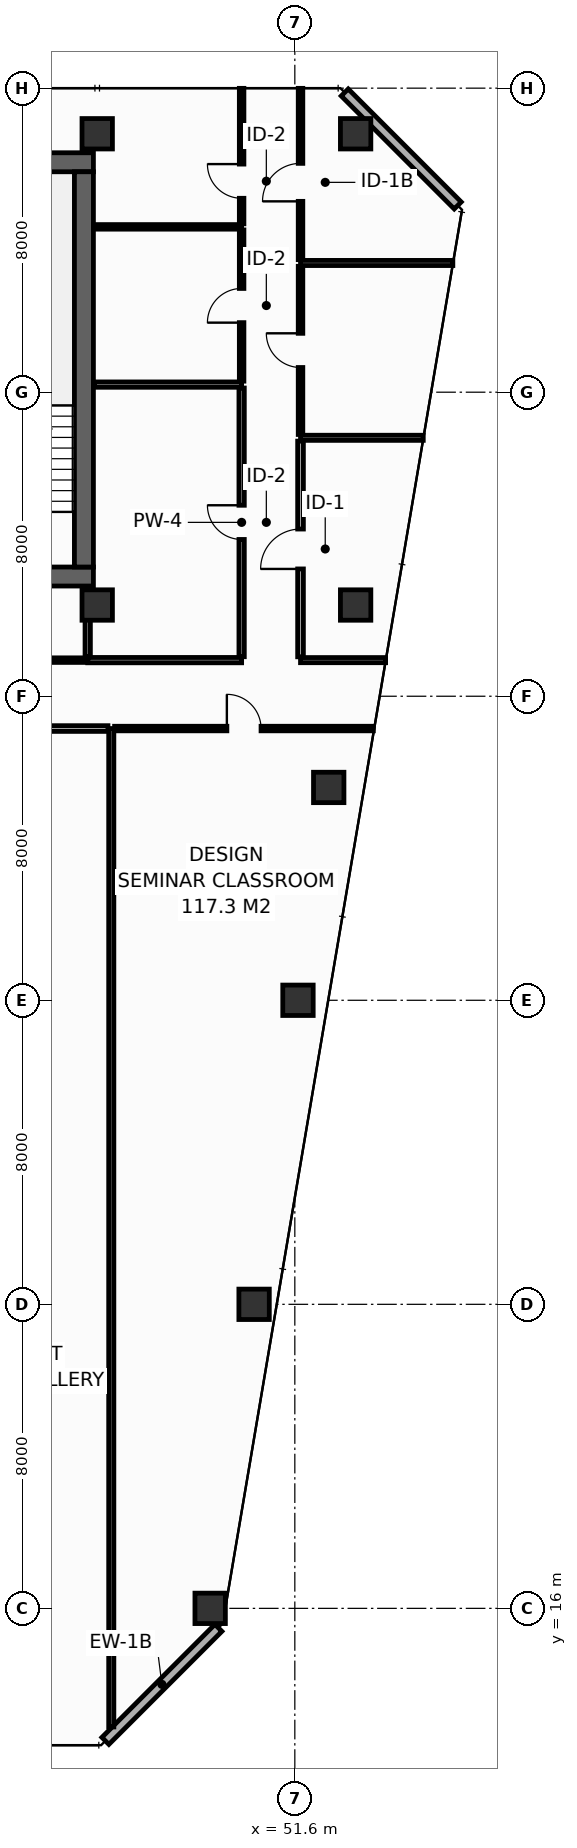
"""IFC4 building model, lengths in metres.
Left out: names, types, materials, properties, quantities, classifications, styles, units other than length and angle.
Written with IfcOpenShell. Run it as: python <this file> out.ifc"""

import sys

from ifc_helpers import new_model, si_unit, direction, frame, frame_2d, origin, origin_2d, place, context, subcontext, project, spatial, rectangle, hollow_rectangle, extrude, element, fill, save


model = new_model("IFC4")
c1 = context("Model", 3, precision=1e-05, world=origin(), true_north=direction((0.0, 1.0)))
c2 = subcontext(c1, "Body", "Model", "MODEL_VIEW")
j1 = project(units=[si_unit("LENGTHUNIT", "METRE"), si_unit("PLANEANGLEUNIT", "RADIAN")], contexts=[c1])
p1 = place(None, origin())
s1 = spatial("IfcSite", under=j1, at=p1, CompositionType="ELEMENT")
p2 = place(p1, origin())
s2 = spatial("IfcBuilding", under=s1, at=p2, CompositionType="ELEMENT")
p3 = place(p2, frame((0.0, 0.0, 182.8)))
s3 = spatial("IfcBuildingStorey", under=s2, at=p3, CompositionType="ELEMENT", Elevation=182.8)
p4 = place(p3, frame((13.6, 43.15, 0.0), z_axis=(0.0, 0.0, 1.0), x_axis=(1.0, 0.0, 0.0)))
e1 = element("IfcWall", 1, at=p4, inside=s3, PredefinedType="SHEAR", context=c2, shape_type="SweptSolid", body=[
    extrude(rectangle(XDim=32.7, YDim=0.5, at=frame_2d((16.35, 0.0))), origin(), (0.0, 0.0, 1.0), 3.55),
])
p5 = place(p4, frame((5.4, 0.0, 0.0)))
e2 = element("IfcOpeningElement", 2, at=p5, cuts=e1, PredefinedType="OPENING", context=c2, shape_type="SweptSolid", body=[
    extrude(rectangle(XDim=1.1, YDim=2.15, at=frame_2d((0.55, 1.075))), frame((0.0, 0.26, 0.0), z_axis=(0.0, -1.0, 0.0), x_axis=(1.0, 0.0, 0.0)), (0.0, 0.0, 1.0), 0.52),
])
p6 = place(p4, frame((25.6, 0.0, 0.0)))
e3 = element("IfcOpeningElement", 3, at=p6, cuts=e1, PredefinedType="OPENING", context=c2, shape_type="SweptSolid", body=[
    extrude(rectangle(XDim=1.1, YDim=2.15, at=frame_2d((0.55, 1.075))), frame((0.0, 0.26, 0.0), z_axis=(0.0, -1.0, 0.0), x_axis=(1.0, 0.0, 0.0)), (0.0, 0.0, 1.0), 0.52),
])
p7 = place(p3, frame((13.6, 54.05, 0.0), z_axis=(0.0, 0.0, 1.0), x_axis=(1.0, 0.0, 0.0)))
e4 = element("IfcWall", 4, at=p7, inside=s3, PredefinedType="SHEAR", context=c2, shape_type="SweptSolid", body=[
    extrude(rectangle(XDim=32.7, YDim=0.5, at=frame_2d((16.35, 0.0))), origin(), (0.0, 0.0, 1.0), 3.55),
])
p8 = place(p3, frame((46.05, 43.4, 0.0), z_axis=(0.0, 0.0, 1.0), x_axis=(0.0, 1.0, 0.0)))
e5 = element("IfcWall", 5, at=p8, inside=s3, PredefinedType="SHEAR", context=c2, shape_type="SweptSolid", body=[
    extrude(rectangle(XDim=10.4, YDim=0.5, at=frame_2d((5.2, 0.0))), origin(), (0.0, 0.0, 1.0), 3.55),
])
for number, where, z_axis, x_axis in (
    (6, (46.4, 54.8, 0.0), (0.0, 0.0, 1.0), (1.0, 0.0, 0.0)),
    (7, (53.2, 54.8, 0.0), (0.0, 0.0, 1.0), (1.0, 0.0, 0.0)),
    (8, (46.4, 42.4, 0.0), (0.0, 0.0, 1.0), (1.0, 0.0, 0.0)),
    (9, (53.2, 42.4, 0.0), (0.0, 0.0, 1.0), (1.0, 0.0, 0.0)),
    (10, (49.372, 16.0, 0.0), (0.0, 0.0, 1.0), (1.0, 0.0, 0.0)),
    (11, (50.528, 24.0, 0.0), (0.0, 0.0, 1.0), (1.0, 0.0, 0.0)),
    (12, (51.683, 32.0, 0.0), (0.0, 0.0, 1.0), (1.0, 0.0, 0.0)),
    (13, (52.492, 37.6, 0.0), (0.0, 0.0, 1.0), (1.0, 0.0, 0.0)),
):
    element("IfcColumn", number, at=place(p3, frame(where, z_axis=z_axis, x_axis=x_axis)), inside=s3, PredefinedType="COLUMN", context=c2, shape_type="SweptSolid", body=[
        extrude(hollow_rectangle(XDim=0.8, YDim=0.8, WallThickness=0.036, at=origin_2d()), origin(), (0.0, 0.0, 1.0), 3.8),
    ])
p9 = place(p3, frame((46.615, 12.513, 0.0), z_axis=(0.0, 0.0, 1.0), x_axis=(0.707135806771, 0.70707775441, 0.0)))
e14 = element("IfcWall", 14, at=p9, inside=s3, PredefinedType="STANDARD", context=c2, shape_type="SweptSolid", body=[
    extrude(rectangle(XDim=4.206, YDim=0.26, at=frame_2d((2.103, 0.0))), origin(), (0.0, 0.0, 1.0), 3.55),
])
p10 = place(p3, frame((55.887, 52.913, 0.0), z_axis=(0.0, 0.0, 1.0), x_axis=(-0.707106781187, 0.707106781187, 0.0)))
e15 = element("IfcWall", 15, at=p10, inside=s3, PredefinedType="STANDARD", context=c2, shape_type="SweptSolid", body=[
    extrude(rectangle(XDim=4.206, YDim=0.26, at=frame_2d((2.103, 0.0))), origin(), (0.0, 0.0, 1.0), 3.55),
])
p11 = place(p3, frame((46.15, 40.95, 0.0), z_axis=(0.0, 0.0, 1.0), x_axis=(1.0, 0.0, 0.0)))
e16 = element("IfcWall", 16, at=p11, inside=s3, PredefinedType="PARTITIONING", context=c2, shape_type="SweptSolid", body=[
    extrude(rectangle(XDim=4.05, YDim=0.14, at=frame_2d((2.025, 0.0))), origin(), (0.0, 0.0, 1.0), 3.55),
])
p12 = place(p3, frame((46.15, 41.04, 0.0), z_axis=(0.0, 0.0, 1.0), x_axis=(0.0, 1.0, 0.0)))
e17 = element("IfcWall", 17, at=p12, inside=s3, PredefinedType="PARTITIONING", context=c2, shape_type="SweptSolid", body=[
    extrude(rectangle(XDim=1.84, YDim=0.14, at=frame_2d((0.92, 0.0))), origin(), (0.0, 0.0, 1.0), 3.55),
])
p13 = place(p3, frame((46.32, 48.2, 0.0), z_axis=(0.0, 0.0, 1.0), x_axis=(1.0, 0.0, 0.0)))
e18 = element("IfcWall", 18, at=p13, inside=s3, PredefinedType="PARTITIONING", context=c2, shape_type="SweptSolid", body=[
    extrude(rectangle(XDim=3.88, YDim=0.14, at=frame_2d((1.94, 0.0))), origin(), (0.0, 0.0, 1.0), 3.55),
])
p14 = place(p3, frame((50.2, 41.04, 0.0), z_axis=(0.0, 0.0, 1.0), x_axis=(0.0, 1.0, 0.0)))
e19 = element("IfcWall", 19, at=p14, inside=s3, PredefinedType="PARTITIONING", context=c2, shape_type="SweptSolid", body=[
    extrude(rectangle(XDim=7.07, YDim=0.14, at=frame_2d((3.535, 0.0))), origin(), (0.0, 0.0, 1.0), 2.835),
])
p15 = place(p14, frame((3.085, 0.0, 0.0)))
e20 = element("IfcOpeningElement", 20, at=p15, cuts=e19, PredefinedType="OPENING", context=c2, shape_type="SweptSolid", body=[
    extrude(rectangle(XDim=0.9, YDim=2.1, at=frame_2d((0.45, 1.05))), frame((0.0, 0.08, 0.0), z_axis=(0.0, -1.0, 0.0), x_axis=(1.0, 0.0, 0.0)), (0.0, 0.0, 1.0), 0.16),
])
p16 = place(p3, frame((46.32, 52.35, 0.0), z_axis=(0.0, 0.0, 1.0), x_axis=(1.0, 0.0, 0.0)))
e21 = element("IfcWall", 21, at=p16, inside=s3, PredefinedType="PARTITIONING", context=c2, shape_type="SweptSolid", body=[
    extrude(rectangle(XDim=3.88, YDim=0.12, at=frame_2d((1.94, 0.0))), origin(), (0.0, 0.0, 1.0), 3.55),
])
p17 = place(p3, frame((50.2, 48.29, 0.0), z_axis=(0.0, 0.0, 1.0), x_axis=(0.0, 1.0, 0.0)))
e22 = element("IfcWall", 22, at=p17, inside=s3, PredefinedType="PARTITIONING", context=c2, shape_type="SweptSolid", body=[
    extrude(rectangle(XDim=3.98, YDim=0.12, at=frame_2d((1.99, 0.0))), origin(), (0.0, 0.0, 1.0), 3.55),
])
p18 = place(p17, frame((1.54, 0.0, 0.0)))
e23 = element("IfcOpeningElement", 23, at=p18, cuts=e22, PredefinedType="OPENING", context=c2, shape_type="SweptSolid", body=[
    extrude(rectangle(XDim=0.9, YDim=2.1, at=frame_2d((0.45, 1.05))), frame((0.0, 0.07, 0.0), z_axis=(0.0, -1.0, 0.0), x_axis=(1.0, 0.0, 0.0)), (0.0, 0.0, 1.0), 0.14),
])
p19 = place(p3, frame((50.2, 52.43, 0.0), z_axis=(0.0, 0.0, 1.0), x_axis=(0.0, 1.0, 0.0)))
e24 = element("IfcWall", 24, at=p19, inside=s3, PredefinedType="PARTITIONING", context=c2, shape_type="SweptSolid", body=[
    extrude(rectangle(XDim=3.565, YDim=0.12, at=frame_2d((1.783, 0.0))), origin(), (0.0, 0.0, 1.0), 2.935),
])
p20 = place(p19, frame((0.672, 0.0, 0.0)))
e25 = element("IfcOpeningElement", 25, at=p20, cuts=e24, PredefinedType="OPENING", context=c2, shape_type="SweptSolid", body=[
    extrude(rectangle(XDim=0.9, YDim=2.1, at=frame_2d((0.45, 1.05))), frame((0.0, 0.07, 0.0), z_axis=(0.0, -1.0, 0.0), x_axis=(1.0, 0.0, 0.0)), (0.0, 0.0, 1.0), 0.14),
])
p21 = place(p3, frame((51.75, 40.95, 0.0), z_axis=(0.0, 0.0, 1.0), x_axis=(1.0, 0.0, 0.0)))
e26 = element("IfcWall", 26, at=p21, inside=s3, PredefinedType="PARTITIONING", context=c2, shape_type="SweptSolid", body=[
    extrude(rectangle(XDim=2.239, YDim=0.135, at=frame_2d((1.119, 0.0))), origin(), (0.0, 0.0, 1.0), 3.035),
])
p22 = place(p3, frame((51.75, 46.8, 0.0), z_axis=(0.0, 0.0, 1.0), x_axis=(1.0, 0.0, 0.0)))
e27 = element("IfcWall", 27, at=p22, inside=s3, PredefinedType="PARTITIONING", context=c2, shape_type="SweptSolid", body=[
    extrude(rectangle(XDim=3.229, YDim=0.135, at=frame_2d((1.615, 0.0))), origin(), (0.0, 0.0, 1.0), 2.835),
])
p23 = place(p3, frame((51.75, 51.4, 0.0), z_axis=(0.0, 0.0, 1.0), x_axis=(1.0, 0.0, 0.0)))
e28 = element("IfcWall", 28, at=p23, inside=s3, PredefinedType="PARTITIONING", context=c2, shape_type="SweptSolid", body=[
    extrude(rectangle(XDim=4.008, YDim=0.135, at=frame_2d((2.004, 0.0))), origin(), (0.0, 0.0, 1.0), 2.835),
])
p24 = place(p3, frame((51.75, 41.038, 0.0), z_axis=(0.0, 0.0, 1.0), x_axis=(0.0, 1.0, 0.0)))
e29 = element("IfcWall", 29, at=p24, inside=s3, PredefinedType="PARTITIONING", context=c2, shape_type="SweptSolid", body=[
    extrude(rectangle(XDim=5.675, YDim=0.15, at=frame_2d((2.837, 0.0))), origin(), (0.0, 0.0, 1.0), 2.835),
])
p25 = place(p24, frame((2.312, 0.0, 0.0)))
e30 = element("IfcOpeningElement", 30, at=p25, cuts=e29, PredefinedType="OPENING", context=c2, shape_type="SweptSolid", body=[
    extrude(rectangle(XDim=1.05, YDim=2.15, at=frame_2d((0.525, 1.075))), frame((0.0, 0.085, 0.0), z_axis=(0.0, -1.0, 0.0), x_axis=(1.0, 0.0, 0.0)), (0.0, 0.0, 1.0), 0.17),
])
p26 = place(p3, frame((51.75, 46.887, 0.0), z_axis=(0.0, 0.0, 1.0), x_axis=(0.0, 1.0, 0.0)))
e31 = element("IfcWall", 31, at=p26, inside=s3, PredefinedType="PARTITIONING", context=c2, shape_type="SweptSolid", body=[
    extrude(rectangle(XDim=4.425, YDim=0.12, at=frame_2d((2.212, 0.0))), origin(), (0.0, 0.0, 1.0), 3.55),
])
p27 = place(p26, frame((1.762, 0.0, 0.0)))
e32 = element("IfcOpeningElement", 32, at=p27, cuts=e31, PredefinedType="OPENING", context=c2, shape_type="SweptSolid", body=[
    extrude(rectangle(XDim=0.9, YDim=2.1, at=frame_2d((0.45, 1.05))), frame((0.0, 0.07, 0.0), z_axis=(0.0, -1.0, 0.0), x_axis=(1.0, 0.0, 0.0)), (0.0, 0.0, 1.0), 0.14),
])
p28 = place(p3, frame((51.75, 51.488, 0.0), z_axis=(0.0, 0.0, 1.0), x_axis=(0.0, 1.0, 0.0)))
e33 = element("IfcWall", 33, at=p28, inside=s3, PredefinedType="PARTITIONING", context=c2, shape_type="SweptSolid", body=[
    extrude(rectangle(XDim=4.508, YDim=0.12, at=frame_2d((2.254, 0.0))), origin(), (0.0, 0.0, 1.0), 2.935),
])
p29 = place(p28, frame((1.534, 0.0, 0.0)))
e34 = element("IfcOpeningElement", 34, at=p29, cuts=e33, PredefinedType="OPENING", context=c2, shape_type="SweptSolid", body=[
    extrude(rectangle(XDim=1.0, YDim=2.15, at=frame_2d((0.5, 1.075))), frame((0.0, 0.07, 0.0), z_axis=(0.0, -1.0, 0.0), x_axis=(1.0, 0.0, 0.0)), (0.0, 0.0, 1.0), 0.14),
])
p30 = place(p3, frame((40.995, 40.95, 0.0), z_axis=(0.0, 0.0, 1.0), x_axis=(1.0, 0.0, 0.0)))
e35 = element("IfcWall", 35, at=p30, inside=s3, PredefinedType="PARTITIONING", context=c2, shape_type="SweptSolid", body=[
    extrude(rectangle(XDim=5.155, YDim=0.12, at=frame_2d((2.577, 0.0))), origin(), (0.0, 0.0, 1.0), 3.55),
])
p31 = place(p30, frame((2.128, 0.0, 0.0)))
e36 = element("IfcOpeningElement", 36, at=p31, cuts=e35, PredefinedType="OPENING", context=c2, shape_type="SweptSolid", body=[
    extrude(rectangle(XDim=0.9, YDim=2.1, at=frame_2d((0.45, 1.05))), frame((0.0, 0.07, 0.0), z_axis=(0.0, -1.0, 0.0), x_axis=(1.0, 0.0, 0.0)), (0.0, 0.0, 1.0), 0.14),
])
p32 = place(p3, frame((46.77, 12.88, 0.0), z_axis=(0.0, 0.0, 1.0), x_axis=(0.0, 1.0, 0.0)))
e37 = element("IfcWall", 37, at=p32, inside=s3, PredefinedType="PARTITIONING", context=c2, shape_type="SweptSolid", body=[
    extrude(rectangle(XDim=26.27, YDim=0.135, at=frame_2d((13.135, 0.0))), origin(), (0.0, 0.0, 1.0), 2.835),
])
p33 = place(p3, frame((41.117, 39.15, 0.0), z_axis=(0.0, 0.0, 1.0), x_axis=(1.0, 0.0, 0.0)))
e38 = element("IfcWall", 38, at=p33, inside=s3, PredefinedType="PARTITIONING", context=c2, shape_type="SweptSolid", body=[
    extrude(rectangle(XDim=5.565, YDim=0.15, at=frame_2d((2.783, 0.0))), origin(), (0.0, 0.0, 1.0), 3.55),
])
p34 = place(p33, frame((2.257, 0.0, 0.0)))
e39 = element("IfcOpeningElement", 39, at=p34, cuts=e38, PredefinedType="OPENING", context=c2, shape_type="SweptSolid", body=[
    extrude(rectangle(XDim=1.05, YDim=2.15, at=frame_2d((0.525, 1.075))), frame((0.0, 0.085, 0.0), z_axis=(0.0, -1.0, 0.0), x_axis=(1.0, 0.0, 0.0)), (0.0, 0.0, 1.0), 0.17),
])
p35 = place(p3, frame((46.857, 39.15, 0.0), z_axis=(0.0, 0.0, 1.0), x_axis=(1.0, 0.0, 0.0)))
e40 = element("IfcWall", 40, at=p35, inside=s3, PredefinedType="PARTITIONING", context=c2, shape_type="SweptSolid", body=[
    extrude(rectangle(XDim=6.809, YDim=0.12, at=frame_2d((3.404, 0.0))), origin(), (0.0, 0.0, 1.0), 3.035),
])
p36 = place(p35, frame((2.954, 0.0, 0.0)))
e41 = element("IfcOpeningElement", 41, at=p36, cuts=e40, PredefinedType="OPENING", context=c2, shape_type="SweptSolid", body=[
    extrude(rectangle(XDim=0.9, YDim=2.1, at=frame_2d((0.45, 1.05))), frame((0.0, 0.07, 0.0), z_axis=(0.0, -1.0, 0.0), x_axis=(1.0, 0.0, 0.0)), (0.0, 0.0, 1.0), 0.14),
])
p37 = place(p15, origin())
e42 = element("IfcDoor", 42, at=p37, inside=s3, OperationType="SINGLE_SWING_RIGHT", PredefinedType="DOOR", context=c2, shape_type="SweptSolid", body=[
    extrude(rectangle(XDim=0.9, YDim=2.1, at=frame_2d((0.45, 1.05))), frame((0.0, 0.025, 0.0), z_axis=(0.0, -1.0, 0.0), x_axis=(1.0, 0.0, 0.0)), (0.0, 0.0, 1.0), 0.05),
])
fill(e20, e42)
p38 = place(p18, origin())
e43 = element("IfcDoor", 43, at=p38, inside=s3, OperationType="SINGLE_SWING_LEFT", PredefinedType="DOOR", context=c2, shape_type="SweptSolid", body=[
    extrude(rectangle(XDim=0.9, YDim=2.1, at=frame_2d((0.45, 1.05))), frame((0.0, 0.025, 0.0), z_axis=(0.0, -1.0, 0.0), x_axis=(1.0, 0.0, 0.0)), (0.0, 0.0, 1.0), 0.05),
])
fill(e23, e43)
p39 = place(p20, origin())
e44 = element("IfcDoor", 44, at=p39, inside=s3, OperationType="SINGLE_SWING_RIGHT", PredefinedType="DOOR", context=c2, shape_type="SweptSolid", body=[
    extrude(rectangle(XDim=0.9, YDim=2.1, at=frame_2d((0.45, 1.05))), frame((0.0, 0.025, 0.0), z_axis=(0.0, -1.0, 0.0), x_axis=(1.0, 0.0, 0.0)), (0.0, 0.0, 1.0), 0.05),
])
fill(e25, e44)
p40 = place(p25, origin())
e45 = element("IfcDoor", 45, at=p40, inside=s3, OperationType="SINGLE_SWING_LEFT", PredefinedType="DOOR", context=c2, shape_type="SweptSolid", body=[
    extrude(rectangle(XDim=1.05, YDim=2.15, at=frame_2d((0.525, 1.075))), frame((0.0, 0.025, 0.0), z_axis=(0.0, -1.0, 0.0), x_axis=(1.0, 0.0, 0.0)), (0.0, 0.0, 1.0), 0.05),
])
fill(e30, e45)
p41 = place(p27, origin())
e46 = element("IfcDoor", 46, at=p41, inside=s3, OperationType="SINGLE_SWING_RIGHT", PredefinedType="DOOR", context=c2, shape_type="SweptSolid", body=[
    extrude(rectangle(XDim=0.9, YDim=2.1, at=frame_2d((0.45, 1.05))), frame((0.0, 0.025, 0.0), z_axis=(0.0, -1.0, 0.0), x_axis=(1.0, 0.0, 0.0)), (0.0, 0.0, 1.0), 0.05),
])
fill(e32, e46)
p42 = place(p29, origin())
e47 = element("IfcDoor", 47, at=p42, inside=s3, OperationType="SINGLE_SWING_LEFT", PredefinedType="DOOR", context=c2, shape_type="SweptSolid", body=[
    extrude(rectangle(XDim=1.0, YDim=2.15, at=frame_2d((0.5, 1.075))), frame((0.0, 0.025, 0.0), z_axis=(0.0, -1.0, 0.0), x_axis=(1.0, 0.0, 0.0)), (0.0, 0.0, 1.0), 0.05),
])
fill(e34, e47)
p43 = place(p36, origin())
e48 = element("IfcDoor", 48, at=p43, inside=s3, OperationType="SINGLE_SWING_LEFT", PredefinedType="DOOR", context=c2, shape_type="SweptSolid", body=[
    extrude(rectangle(XDim=0.9, YDim=2.1, at=frame_2d((0.45, 1.05))), frame((0.0, 0.025, 0.0), z_axis=(0.0, -1.0, 0.0), x_axis=(1.0, 0.0, 0.0)), (0.0, 0.0, 1.0), 0.05),
])
fill(e41, e48)
save(model, sys.argv[1])
